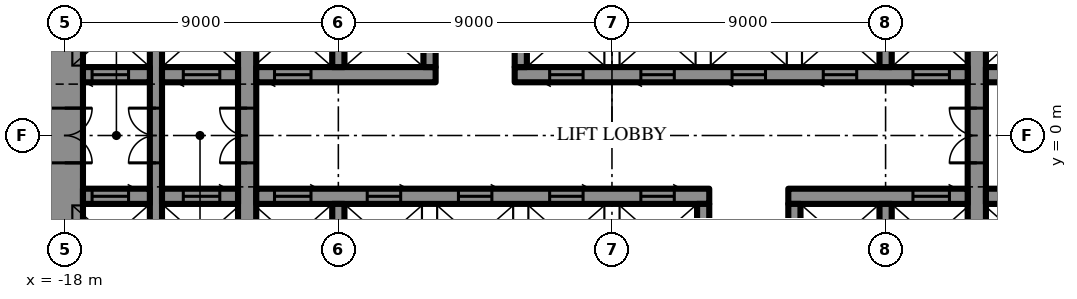
"""IFC4 building model, lengths in metres.
Left out: names, types, materials, properties, quantities, classifications, styles, units other than length and angle.
Written with IfcOpenShell. Run it as: python <this file> out.ifc"""

import sys

from ifc_helpers import new_model, si_unit, direction, frame, frame_2d, origin, place, context, subcontext, project, spatial, rectangle, extrude, element, fill, save


model = new_model("IFC4")
c1 = context("Model", 3, precision=1e-05, world=origin(), true_north=direction((0.0, 1.0)))
c2 = subcontext(c1, "Body", "Model", "MODEL_VIEW")
j1 = project(units=[si_unit("LENGTHUNIT", "METRE"), si_unit("PLANEANGLEUNIT", "RADIAN")], contexts=[c1])
p1 = place(None, origin())
s1 = spatial("IfcSite", under=j1, at=p1, CompositionType="ELEMENT")
p2 = place(p1, origin())
s2 = spatial("IfcBuilding", under=s1, at=p2, CompositionType="ELEMENT")
p3 = place(p2, origin())
s3 = spatial("IfcBuildingStorey", under=s2, at=p3, CompositionType="ELEMENT", Elevation=0.0)
p4 = place(p3, frame((-18.0, 10.7, 0.0), z_axis=(0.0, 0.0, 1.0), x_axis=(0.0, -1.0, 0.0)))
e1 = element("IfcWall", 1, at=p4, inside=s3, PredefinedType="SHEAR", context=c2, shape_type="SweptSolid", body=[
    extrude(rectangle(XDim=21.4, YDim=1.2, at=frame_2d((10.7, 0.0))), origin(), (0.0, 0.0, 1.0), 7.0),
])
p5 = place(p4, frame((9.8, 0.0, 0.0)))
e2 = element("IfcOpeningElement", 2, at=p5, cuts=e1, PredefinedType="OPENING", context=c2, shape_type="SweptSolid", body=[
    extrude(rectangle(XDim=1.8, YDim=2.4, at=frame_2d((0.9, 1.2))), frame((0.0, 0.61, 0.0), z_axis=(0.0, -1.0, 0.0), x_axis=(1.0, 0.0, 0.0)), (0.0, 0.0, 1.0), 1.22),
])
p6 = place(p3, frame((12.0, -10.7, 0.0), z_axis=(0.0, 0.0, 1.0), x_axis=(0.0, 1.0, 0.0)))
e3 = element("IfcWall", 3, at=p6, inside=s3, PredefinedType="SHEAR", context=c2, shape_type="SweptSolid", body=[
    extrude(rectangle(XDim=21.4, YDim=0.6, at=frame_2d((10.7, 0.0))), origin(), (0.0, 0.0, 1.0), 7.0),
])
p7 = place(p6, frame((9.8, 0.0, 0.0)))
e4 = element("IfcOpeningElement", 4, at=p7, cuts=e3, PredefinedType="OPENING", context=c2, shape_type="SweptSolid", body=[
    extrude(rectangle(XDim=1.8, YDim=2.4, at=frame_2d((0.9, 1.2))), frame((0.0, 0.31, 0.0), z_axis=(0.0, -1.0, 0.0), x_axis=(1.0, 0.0, 0.0)), (0.0, 0.0, 1.0), 0.62),
])
p8 = place(p3, frame((-12.0, -10.7, 0.0), z_axis=(0.0, 0.0, 1.0), x_axis=(0.0, 1.0, 0.0)))
e5 = element("IfcWall", 5, at=p8, inside=s3, PredefinedType="SHEAR", context=c2, shape_type="SweptSolid", body=[
    extrude(rectangle(XDim=21.4, YDim=0.6, at=frame_2d((10.7, 0.0))), origin(), (0.0, 0.0, 1.0), 7.0),
])
p9 = place(p8, frame((9.8, 0.0, 0.0)))
e6 = element("IfcOpeningElement", 6, at=p9, cuts=e5, PredefinedType="OPENING", context=c2, shape_type="SweptSolid", body=[
    extrude(rectangle(XDim=1.8, YDim=2.4, at=frame_2d((0.9, 1.2))), frame((0.0, 0.31, 0.0), z_axis=(0.0, -1.0, 0.0), x_axis=(1.0, 0.0, 0.0)), (0.0, 0.0, 1.0), 0.62),
])
p10 = place(p3, frame((-15.0, -10.7, 0.0), z_axis=(0.0, 0.0, 1.0), x_axis=(0.0, 1.0, 0.0)))
e7 = element("IfcWall", 7, at=p10, inside=s3, PredefinedType="SHEAR", context=c2, shape_type="SweptSolid", body=[
    extrude(rectangle(XDim=21.4, YDim=0.4, at=frame_2d((10.7, 0.0))), origin(), (0.0, 0.0, 1.0), 7.0),
])
p11 = place(p10, frame((9.8, 0.0, 0.0)))
e8 = element("IfcOpeningElement", 8, at=p11, cuts=e7, PredefinedType="OPENING", context=c2, shape_type="SweptSolid", body=[
    extrude(rectangle(XDim=1.8, YDim=2.4, at=frame_2d((0.9, 1.2))), frame((0.0, 0.21, 0.0), z_axis=(0.0, -1.0, 0.0), x_axis=(1.0, 0.0, 0.0)), (0.0, 0.0, 1.0), 0.42),
])
p12 = place(p3, frame((-17.4, 2.0, 0.0), z_axis=(0.0, 0.0, 1.0), x_axis=(1.0, 0.0, 0.0)))
e9 = element("IfcWall", 9, at=p12, inside=s3, PredefinedType="SHEAR", context=c2, shape_type="SweptSolid", body=[
    extrude(rectangle(XDim=2.2, YDim=0.5, at=frame_2d((1.1, 0.0))), origin(), (0.0, 0.0, 1.0), 7.0),
])
p13 = place(p12, frame((0.3, 0.0, 0.0)))
e10 = element("IfcOpeningElement", 10, at=p13, cuts=e9, PredefinedType="OPENING", context=c2, shape_type="SweptSolid", body=[
    extrude(rectangle(XDim=1.2, YDim=2.2, at=frame_2d((0.6, 1.1))), frame((0.0, 0.26, 0.0), z_axis=(0.0, -1.0, 0.0), x_axis=(1.0, 0.0, 0.0)), (0.0, 0.0, 1.0), 0.52),
])
p14 = place(p3, frame((-14.8, 2.0, 0.0), z_axis=(0.0, 0.0, 1.0), x_axis=(1.0, 0.0, 0.0)))
e11 = element("IfcWall", 11, at=p14, inside=s3, PredefinedType="SHEAR", context=c2, shape_type="SweptSolid", body=[
    extrude(rectangle(XDim=2.5, YDim=0.5, at=frame_2d((1.25, 0.0))), origin(), (0.0, 0.0, 1.0), 7.0),
])
p15 = place(p14, frame((0.7, 0.0, 0.0)))
e12 = element("IfcOpeningElement", 12, at=p15, cuts=e11, PredefinedType="OPENING", context=c2, shape_type="SweptSolid", body=[
    extrude(rectangle(XDim=1.2, YDim=2.2, at=frame_2d((0.6, 1.1))), frame((0.0, 0.26, 0.0), z_axis=(0.0, -1.0, 0.0), x_axis=(1.0, 0.0, 0.0)), (0.0, 0.0, 1.0), 0.52),
])
p16 = place(p3, frame((-11.7, 2.0, 0.0), z_axis=(0.0, 0.0, 1.0), x_axis=(1.0, 0.0, 0.0)))
e13 = element("IfcWall", 13, at=p16, inside=s3, PredefinedType="SHEAR", context=c2, shape_type="SweptSolid", body=[
    extrude(rectangle(XDim=5.9, YDim=0.5, at=frame_2d((2.95, 0.0))), origin(), (0.0, 0.0, 1.0), 7.0),
])
p17 = place(p16, frame((0.6, 0.0, 0.0)))
e14 = element("IfcOpeningElement", 14, at=p17, cuts=e13, PredefinedType="OPENING", context=c2, shape_type="SweptSolid", body=[
    extrude(rectangle(XDim=1.2, YDim=2.2, at=frame_2d((0.6, 1.1))), frame((0.0, 0.26, 0.0), z_axis=(0.0, -1.0, 0.0), x_axis=(1.0, 0.0, 0.0)), (0.0, 0.0, 1.0), 0.52),
])
p18 = place(p3, frame((-3.2, 2.0, 0.0), z_axis=(0.0, 0.0, 1.0), x_axis=(1.0, 0.0, 0.0)))
e15 = element("IfcWall", 15, at=p18, inside=s3, PredefinedType="SHEAR", context=c2, shape_type="SweptSolid", body=[
    extrude(rectangle(XDim=14.9, YDim=0.5, at=frame_2d((7.45, 0.0))), origin(), (0.0, 0.0, 1.0), 7.0),
])
p19 = place(p18, frame((1.15, 0.0, 0.0)))
e16 = element("IfcOpeningElement", 16, at=p19, cuts=e15, PredefinedType="OPENING", context=c2, shape_type="SweptSolid", body=[
    extrude(rectangle(XDim=1.1, YDim=2.2, at=frame_2d((0.55, 1.1))), frame((0.0, 0.26, 0.0), z_axis=(0.0, -1.0, 0.0), x_axis=(1.0, 0.0, 0.0)), (0.0, 0.0, 1.0), 0.52),
])
p20 = place(p18, frame((4.15, 0.0, 0.0)))
e17 = element("IfcOpeningElement", 17, at=p20, cuts=e15, PredefinedType="OPENING", context=c2, shape_type="SweptSolid", body=[
    extrude(rectangle(XDim=1.1, YDim=2.2, at=frame_2d((0.55, 1.1))), frame((0.0, 0.26, 0.0), z_axis=(0.0, -1.0, 0.0), x_axis=(1.0, 0.0, 0.0)), (0.0, 0.0, 1.0), 0.52),
])
p21 = place(p18, frame((7.15, 0.0, 0.0)))
e18 = element("IfcOpeningElement", 18, at=p21, cuts=e15, PredefinedType="OPENING", context=c2, shape_type="SweptSolid", body=[
    extrude(rectangle(XDim=1.1, YDim=2.2, at=frame_2d((0.55, 1.1))), frame((0.0, 0.26, 0.0), z_axis=(0.0, -1.0, 0.0), x_axis=(1.0, 0.0, 0.0)), (0.0, 0.0, 1.0), 0.52),
])
p22 = place(p18, frame((10.15, 0.0, 0.0)))
e19 = element("IfcOpeningElement", 19, at=p22, cuts=e15, PredefinedType="OPENING", context=c2, shape_type="SweptSolid", body=[
    extrude(rectangle(XDim=1.1, YDim=2.2, at=frame_2d((0.55, 1.1))), frame((0.0, 0.26, 0.0), z_axis=(0.0, -1.0, 0.0), x_axis=(1.0, 0.0, 0.0)), (0.0, 0.0, 1.0), 0.52),
])
p23 = place(p18, frame((13.1, 0.0, 0.0)))
e20 = element("IfcOpeningElement", 20, at=p23, cuts=e15, PredefinedType="OPENING", context=c2, shape_type="SweptSolid", body=[
    extrude(rectangle(XDim=1.2, YDim=2.2, at=frame_2d((0.6, 1.1))), frame((0.0, 0.26, 0.0), z_axis=(0.0, -1.0, 0.0), x_axis=(1.0, 0.0, 0.0)), (0.0, 0.0, 1.0), 0.52),
])
p24 = place(p3, frame((12.3, 2.0, 0.0), z_axis=(0.0, 0.0, 1.0), x_axis=(1.0, 0.0, 0.0)))
e21 = element("IfcWall", 21, at=p24, inside=s3, PredefinedType="SHEAR", context=c2, shape_type="SweptSolid", body=[
    extrude(rectangle(XDim=2.5, YDim=0.5, at=frame_2d((1.25, 0.0))), origin(), (0.0, 0.0, 1.0), 7.0),
])
p25 = place(p24, frame((0.6, 0.0, 0.0)))
e22 = element("IfcOpeningElement", 22, at=p25, cuts=e21, PredefinedType="OPENING", context=c2, shape_type="SweptSolid", body=[
    extrude(rectangle(XDim=1.2, YDim=2.2, at=frame_2d((0.6, 1.1))), frame((0.0, 0.26, 0.0), z_axis=(0.0, -1.0, 0.0), x_axis=(1.0, 0.0, 0.0)), (0.0, 0.0, 1.0), 0.52),
])
for number, where, z_axis, x_axis in (
    (23, (-9.0, 2.25, 0.0), (0.0, 0.0, 1.0), (0.0, 1.0, 0.0)),
    (24, (-6.0, 2.25, 0.0), (0.0, 0.0, 1.0), (0.0, 1.0, 0.0)),
    (25, (-3.0, 2.25, 0.0), (0.0, 0.0, 1.0), (0.0, 1.0, 0.0)),
    (26, (9.0, 2.25, 0.0), (0.0, 0.0, 1.0), (0.0, 1.0, 0.0)),
):
    element("IfcWall", number, at=place(p3, frame(where, z_axis=z_axis, x_axis=x_axis)), inside=s3, PredefinedType="SHEAR", context=c2, shape_type="SweptSolid", body=[
        extrude(rectangle(XDim=2.3, YDim=0.4, at=frame_2d((1.15, 0.0))), origin(), (0.0, 0.0, 1.0), 7.0),
    ])
p26 = place(p3, frame((14.8, -2.0, 0.0), z_axis=(0.0, 0.0, 1.0), x_axis=(-1.0, 0.0, 0.0)))
e27 = element("IfcWall", 27, at=p26, inside=s3, PredefinedType="SHEAR", context=c2, shape_type="SweptSolid", body=[
    extrude(rectangle(XDim=2.5, YDim=0.5, at=frame_2d((1.25, 0.0))), origin(), (0.0, 0.0, 1.0), 7.0),
])
p27 = place(p26, frame((0.7, 0.0, 0.0)))
e28 = element("IfcOpeningElement", 28, at=p27, cuts=e27, PredefinedType="OPENING", context=c2, shape_type="SweptSolid", body=[
    extrude(rectangle(XDim=1.2, YDim=2.2, at=frame_2d((0.6, 1.1))), frame((0.0, 0.26, 0.0), z_axis=(0.0, -1.0, 0.0), x_axis=(1.0, 0.0, 0.0)), (0.0, 0.0, 1.0), 0.52),
])
p28 = place(p3, frame((11.7, -2.0, 0.0), z_axis=(0.0, 0.0, 1.0), x_axis=(-1.0, 0.0, 0.0)))
e29 = element("IfcWall", 29, at=p28, inside=s3, PredefinedType="SHEAR", context=c2, shape_type="SweptSolid", body=[
    extrude(rectangle(XDim=5.9, YDim=0.5, at=frame_2d((2.95, 0.0))), origin(), (0.0, 0.0, 1.0), 7.0),
])
p29 = place(p28, frame((0.6, 0.0, 0.0)))
e30 = element("IfcOpeningElement", 30, at=p29, cuts=e29, PredefinedType="OPENING", context=c2, shape_type="SweptSolid", body=[
    extrude(rectangle(XDim=1.2, YDim=2.2, at=frame_2d((0.6, 1.1))), frame((0.0, 0.26, 0.0), z_axis=(0.0, -1.0, 0.0), x_axis=(1.0, 0.0, 0.0)), (0.0, 0.0, 1.0), 0.52),
])
p30 = place(p3, frame((3.2, -2.0, 0.0), z_axis=(0.0, 0.0, 1.0), x_axis=(-1.0, 0.0, 0.0)))
e31 = element("IfcWall", 31, at=p30, inside=s3, PredefinedType="SHEAR", context=c2, shape_type="SweptSolid", body=[
    extrude(rectangle(XDim=14.9, YDim=0.5, at=frame_2d((7.45, 0.0))), origin(), (0.0, 0.0, 1.0), 7.0),
])
p31 = place(p30, frame((1.15, 0.0, 0.0)))
e32 = element("IfcOpeningElement", 32, at=p31, cuts=e31, PredefinedType="OPENING", context=c2, shape_type="SweptSolid", body=[
    extrude(rectangle(XDim=1.1, YDim=2.2, at=frame_2d((0.55, 1.1))), frame((0.0, 0.26, 0.0), z_axis=(0.0, -1.0, 0.0), x_axis=(1.0, 0.0, 0.0)), (0.0, 0.0, 1.0), 0.52),
])
p32 = place(p30, frame((4.15, 0.0, 0.0)))
e33 = element("IfcOpeningElement", 33, at=p32, cuts=e31, PredefinedType="OPENING", context=c2, shape_type="SweptSolid", body=[
    extrude(rectangle(XDim=1.1, YDim=2.2, at=frame_2d((0.55, 1.1))), frame((0.0, 0.26, 0.0), z_axis=(0.0, -1.0, 0.0), x_axis=(1.0, 0.0, 0.0)), (0.0, 0.0, 1.0), 0.52),
])
p33 = place(p30, frame((7.15, 0.0, 0.0)))
e34 = element("IfcOpeningElement", 34, at=p33, cuts=e31, PredefinedType="OPENING", context=c2, shape_type="SweptSolid", body=[
    extrude(rectangle(XDim=1.1, YDim=2.2, at=frame_2d((0.55, 1.1))), frame((0.0, 0.26, 0.0), z_axis=(0.0, -1.0, 0.0), x_axis=(1.0, 0.0, 0.0)), (0.0, 0.0, 1.0), 0.52),
])
p34 = place(p30, frame((10.15, 0.0, 0.0)))
e35 = element("IfcOpeningElement", 35, at=p34, cuts=e31, PredefinedType="OPENING", context=c2, shape_type="SweptSolid", body=[
    extrude(rectangle(XDim=1.1, YDim=2.2, at=frame_2d((0.55, 1.1))), frame((0.0, 0.26, 0.0), z_axis=(0.0, -1.0, 0.0), x_axis=(1.0, 0.0, 0.0)), (0.0, 0.0, 1.0), 0.52),
])
p35 = place(p30, frame((13.1, 0.0, 0.0)))
e36 = element("IfcOpeningElement", 36, at=p35, cuts=e31, PredefinedType="OPENING", context=c2, shape_type="SweptSolid", body=[
    extrude(rectangle(XDim=1.2, YDim=2.2, at=frame_2d((0.6, 1.1))), frame((0.0, 0.26, 0.0), z_axis=(0.0, -1.0, 0.0), x_axis=(1.0, 0.0, 0.0)), (0.0, 0.0, 1.0), 0.52),
])
p36 = place(p3, frame((-12.3, -2.0, 0.0), z_axis=(0.0, 0.0, 1.0), x_axis=(-1.0, 0.0, 0.0)))
e37 = element("IfcWall", 37, at=p36, inside=s3, PredefinedType="SHEAR", context=c2, shape_type="SweptSolid", body=[
    extrude(rectangle(XDim=2.5, YDim=0.5, at=frame_2d((1.25, 0.0))), origin(), (0.0, 0.0, 1.0), 7.0),
])
p37 = place(p36, frame((0.6, 0.0, 0.0)))
e38 = element("IfcOpeningElement", 38, at=p37, cuts=e37, PredefinedType="OPENING", context=c2, shape_type="SweptSolid", body=[
    extrude(rectangle(XDim=1.2, YDim=2.2, at=frame_2d((0.6, 1.1))), frame((0.0, 0.26, 0.0), z_axis=(0.0, -1.0, 0.0), x_axis=(1.0, 0.0, 0.0)), (0.0, 0.0, 1.0), 0.52),
])
p38 = place(p3, frame((-15.2, -2.0, 0.0), z_axis=(0.0, 0.0, 1.0), x_axis=(-1.0, 0.0, 0.0)))
e39 = element("IfcWall", 39, at=p38, inside=s3, PredefinedType="SHEAR", context=c2, shape_type="SweptSolid", body=[
    extrude(rectangle(XDim=2.2, YDim=0.5, at=frame_2d((1.1, 0.0))), origin(), (0.0, 0.0, 1.0), 7.0),
])
p39 = place(p38, frame((0.7, 0.0, 0.0)))
e40 = element("IfcOpeningElement", 40, at=p39, cuts=e39, PredefinedType="OPENING", context=c2, shape_type="SweptSolid", body=[
    extrude(rectangle(XDim=1.2, YDim=2.2, at=frame_2d((0.6, 1.1))), frame((0.0, 0.26, 0.0), z_axis=(0.0, -1.0, 0.0), x_axis=(1.0, 0.0, 0.0)), (0.0, 0.0, 1.0), 0.52),
])
for number, where, z_axis, x_axis in (
    (41, (9.0, -2.25, 0.0), (0.0, 0.0, 1.0), (0.0, -1.0, 0.0)),
    (42, (6.0, -2.25, 0.0), (0.0, 0.0, 1.0), (0.0, -1.0, 0.0)),
    (43, (3.0, -2.25, 0.0), (0.0, 0.0, 1.0), (0.0, -1.0, 0.0)),
    (44, (-9.0, -2.25, 0.0), (0.0, 0.0, 1.0), (0.0, -1.0, 0.0)),
):
    element("IfcWall", number, at=place(p3, frame(where, z_axis=z_axis, x_axis=x_axis)), inside=s3, PredefinedType="SHEAR", context=c2, shape_type="SweptSolid", body=[
        extrude(rectangle(XDim=2.3, YDim=0.4, at=frame_2d((1.15, 0.0))), origin(), (0.0, 0.0, 1.0), 7.0),
    ])
p40 = place(p5, origin())
e45 = element("IfcDoor", 45, at=p40, inside=s3, OperationType="DOUBLE_DOOR_SINGLE_SWING", PredefinedType="DOOR", context=c2, shape_type="SweptSolid", body=[
    extrude(rectangle(XDim=1.8, YDim=2.4, at=frame_2d((0.9, 1.2))), frame((0.0, 0.025, 0.0), z_axis=(0.0, -1.0, 0.0), x_axis=(1.0, 0.0, 0.0)), (0.0, 0.0, 1.0), 0.05),
])
fill(e2, e45)
p41 = place(p7, origin())
e46 = element("IfcDoor", 46, at=p41, inside=s3, OperationType="DOUBLE_DOOR_SINGLE_SWING", PredefinedType="DOOR", context=c2, shape_type="SweptSolid", body=[
    extrude(rectangle(XDim=1.8, YDim=2.4, at=frame_2d((0.9, 1.2))), frame((0.0, 0.025, 0.0), z_axis=(0.0, -1.0, 0.0), x_axis=(1.0, 0.0, 0.0)), (0.0, 0.0, 1.0), 0.05),
])
fill(e4, e46)
p42 = place(p9, origin())
e47 = element("IfcDoor", 47, at=p42, inside=s3, OperationType="DOUBLE_DOOR_SINGLE_SWING", PredefinedType="DOOR", context=c2, shape_type="SweptSolid", body=[
    extrude(rectangle(XDim=1.8, YDim=2.4, at=frame_2d((0.9, 1.2))), frame((0.0, 0.025, 0.0), z_axis=(0.0, -1.0, 0.0), x_axis=(1.0, 0.0, 0.0)), (0.0, 0.0, 1.0), 0.05),
])
fill(e6, e47)
p43 = place(p11, origin())
e48 = element("IfcDoor", 48, at=p43, inside=s3, OperationType="DOUBLE_DOOR_SINGLE_SWING", PredefinedType="DOOR", context=c2, shape_type="SweptSolid", body=[
    extrude(rectangle(XDim=1.8, YDim=2.4, at=frame_2d((0.9, 1.2))), frame((0.0, 0.025, 0.0), z_axis=(0.0, -1.0, 0.0), x_axis=(1.0, 0.0, 0.0)), (0.0, 0.0, 1.0), 0.05),
])
fill(e8, e48)
p44 = place(p13, frame((1.2, 0.0, 0.0), z_axis=(0.0, 0.0, 1.0), x_axis=(-1.0, 0.0, 0.0)))
e49 = element("IfcDoor", 49, at=p44, inside=s3, OperationType="SLIDING_TO_LEFT", PredefinedType="DOOR", context=c2, shape_type="SweptSolid", body=[
    extrude(rectangle(XDim=1.2, YDim=2.2, at=frame_2d((0.6, 1.1))), frame((0.0, 0.025, 0.0), z_axis=(0.0, -1.0, 0.0), x_axis=(1.0, 0.0, 0.0)), (0.0, 0.0, 1.0), 0.05),
])
fill(e10, e49)
p45 = place(p15, frame((1.2, 0.0, 0.0), z_axis=(0.0, 0.0, 1.0), x_axis=(-1.0, 0.0, 0.0)))
e50 = element("IfcDoor", 50, at=p45, inside=s3, OperationType="SLIDING_TO_LEFT", PredefinedType="DOOR", context=c2, shape_type="SweptSolid", body=[
    extrude(rectangle(XDim=1.2, YDim=2.2, at=frame_2d((0.6, 1.1))), frame((0.0, 0.025, 0.0), z_axis=(0.0, -1.0, 0.0), x_axis=(1.0, 0.0, 0.0)), (0.0, 0.0, 1.0), 0.05),
])
fill(e12, e50)
p46 = place(p17, frame((1.2, 0.0, 0.0), z_axis=(0.0, 0.0, 1.0), x_axis=(-1.0, 0.0, 0.0)))
e51 = element("IfcDoor", 51, at=p46, inside=s3, OperationType="SLIDING_TO_LEFT", PredefinedType="DOOR", context=c2, shape_type="SweptSolid", body=[
    extrude(rectangle(XDim=1.2, YDim=2.2, at=frame_2d((0.6, 1.1))), frame((0.0, 0.025, 0.0), z_axis=(0.0, -1.0, 0.0), x_axis=(1.0, 0.0, 0.0)), (0.0, 0.0, 1.0), 0.05),
])
fill(e14, e51)
p47 = place(p19, frame((1.1, 0.0, 0.0), z_axis=(0.0, 0.0, 1.0), x_axis=(-1.0, 0.0, 0.0)))
e52 = element("IfcDoor", 52, at=p47, inside=s3, OperationType="SLIDING_TO_LEFT", PredefinedType="DOOR", context=c2, shape_type="SweptSolid", body=[
    extrude(rectangle(XDim=1.1, YDim=2.2, at=frame_2d((0.55, 1.1))), frame((0.0, 0.025, 0.0), z_axis=(0.0, -1.0, 0.0), x_axis=(1.0, 0.0, 0.0)), (0.0, 0.0, 1.0), 0.05),
])
fill(e16, e52)
p48 = place(p20, frame((1.1, 0.0, 0.0), z_axis=(0.0, 0.0, 1.0), x_axis=(-1.0, 0.0, 0.0)))
e53 = element("IfcDoor", 53, at=p48, inside=s3, OperationType="SLIDING_TO_LEFT", PredefinedType="DOOR", context=c2, shape_type="SweptSolid", body=[
    extrude(rectangle(XDim=1.1, YDim=2.2, at=frame_2d((0.55, 1.1))), frame((0.0, 0.025, 0.0), z_axis=(0.0, -1.0, 0.0), x_axis=(1.0, 0.0, 0.0)), (0.0, 0.0, 1.0), 0.05),
])
fill(e17, e53)
p49 = place(p21, frame((1.1, 0.0, 0.0), z_axis=(0.0, 0.0, 1.0), x_axis=(-1.0, 0.0, 0.0)))
e54 = element("IfcDoor", 54, at=p49, inside=s3, OperationType="SLIDING_TO_LEFT", PredefinedType="DOOR", context=c2, shape_type="SweptSolid", body=[
    extrude(rectangle(XDim=1.1, YDim=2.2, at=frame_2d((0.55, 1.1))), frame((0.0, 0.025, 0.0), z_axis=(0.0, -1.0, 0.0), x_axis=(1.0, 0.0, 0.0)), (0.0, 0.0, 1.0), 0.05),
])
fill(e18, e54)
p50 = place(p22, frame((1.1, 0.0, 0.0), z_axis=(0.0, 0.0, 1.0), x_axis=(-1.0, 0.0, 0.0)))
e55 = element("IfcDoor", 55, at=p50, inside=s3, OperationType="SLIDING_TO_LEFT", PredefinedType="DOOR", context=c2, shape_type="SweptSolid", body=[
    extrude(rectangle(XDim=1.1, YDim=2.2, at=frame_2d((0.55, 1.1))), frame((0.0, 0.025, 0.0), z_axis=(0.0, -1.0, 0.0), x_axis=(1.0, 0.0, 0.0)), (0.0, 0.0, 1.0), 0.05),
])
fill(e19, e55)
p51 = place(p23, frame((1.2, 0.0, 0.0), z_axis=(0.0, 0.0, 1.0), x_axis=(-1.0, 0.0, 0.0)))
e56 = element("IfcDoor", 56, at=p51, inside=s3, OperationType="SLIDING_TO_LEFT", PredefinedType="DOOR", context=c2, shape_type="SweptSolid", body=[
    extrude(rectangle(XDim=1.2, YDim=2.2, at=frame_2d((0.6, 1.1))), frame((0.0, 0.025, 0.0), z_axis=(0.0, -1.0, 0.0), x_axis=(1.0, 0.0, 0.0)), (0.0, 0.0, 1.0), 0.05),
])
fill(e20, e56)
p52 = place(p29, frame((1.2, 0.0, 0.0), z_axis=(0.0, 0.0, 1.0), x_axis=(-1.0, 0.0, 0.0)))
e57 = element("IfcDoor", 57, at=p52, inside=s3, OperationType="SLIDING_TO_LEFT", PredefinedType="DOOR", context=c2, shape_type="SweptSolid", body=[
    extrude(rectangle(XDim=1.2, YDim=2.2, at=frame_2d((0.6, 1.1))), frame((0.0, 0.025, 0.0), z_axis=(0.0, -1.0, 0.0), x_axis=(1.0, 0.0, 0.0)), (0.0, 0.0, 1.0), 0.05),
])
fill(e30, e57)
p53 = place(p31, frame((1.1, 0.0, 0.0), z_axis=(0.0, 0.0, 1.0), x_axis=(-1.0, 0.0, 0.0)))
e58 = element("IfcDoor", 58, at=p53, inside=s3, OperationType="SLIDING_TO_LEFT", PredefinedType="DOOR", context=c2, shape_type="SweptSolid", body=[
    extrude(rectangle(XDim=1.1, YDim=2.2, at=frame_2d((0.55, 1.1))), frame((0.0, 0.025, 0.0), z_axis=(0.0, -1.0, 0.0), x_axis=(1.0, 0.0, 0.0)), (0.0, 0.0, 1.0), 0.05),
])
fill(e32, e58)
p54 = place(p32, frame((1.1, 0.0, 0.0), z_axis=(0.0, 0.0, 1.0), x_axis=(-1.0, 0.0, 0.0)))
e59 = element("IfcDoor", 59, at=p54, inside=s3, OperationType="SLIDING_TO_LEFT", PredefinedType="DOOR", context=c2, shape_type="SweptSolid", body=[
    extrude(rectangle(XDim=1.1, YDim=2.2, at=frame_2d((0.55, 1.1))), frame((0.0, 0.025, 0.0), z_axis=(0.0, -1.0, 0.0), x_axis=(1.0, 0.0, 0.0)), (0.0, 0.0, 1.0), 0.05),
])
fill(e33, e59)
p55 = place(p33, frame((1.1, 0.0, 0.0), z_axis=(0.0, 0.0, 1.0), x_axis=(-1.0, 0.0, 0.0)))
e60 = element("IfcDoor", 60, at=p55, inside=s3, OperationType="SLIDING_TO_LEFT", PredefinedType="DOOR", context=c2, shape_type="SweptSolid", body=[
    extrude(rectangle(XDim=1.1, YDim=2.2, at=frame_2d((0.55, 1.1))), frame((0.0, 0.025, 0.0), z_axis=(0.0, -1.0, 0.0), x_axis=(1.0, 0.0, 0.0)), (0.0, 0.0, 1.0), 0.05),
])
fill(e34, e60)
p56 = place(p34, frame((1.1, 0.0, 0.0), z_axis=(0.0, 0.0, 1.0), x_axis=(-1.0, 0.0, 0.0)))
e61 = element("IfcDoor", 61, at=p56, inside=s3, OperationType="SLIDING_TO_LEFT", PredefinedType="DOOR", context=c2, shape_type="SweptSolid", body=[
    extrude(rectangle(XDim=1.1, YDim=2.2, at=frame_2d((0.55, 1.1))), frame((0.0, 0.025, 0.0), z_axis=(0.0, -1.0, 0.0), x_axis=(1.0, 0.0, 0.0)), (0.0, 0.0, 1.0), 0.05),
])
fill(e35, e61)
p57 = place(p35, frame((1.2, 0.0, 0.0), z_axis=(0.0, 0.0, 1.0), x_axis=(-1.0, 0.0, 0.0)))
e62 = element("IfcDoor", 62, at=p57, inside=s3, OperationType="SLIDING_TO_LEFT", PredefinedType="DOOR", context=c2, shape_type="SweptSolid", body=[
    extrude(rectangle(XDim=1.2, YDim=2.2, at=frame_2d((0.6, 1.1))), frame((0.0, 0.025, 0.0), z_axis=(0.0, -1.0, 0.0), x_axis=(1.0, 0.0, 0.0)), (0.0, 0.0, 1.0), 0.05),
])
fill(e36, e62)
p58 = place(p37, frame((1.2, 0.0, 0.0), z_axis=(0.0, 0.0, 1.0), x_axis=(-1.0, 0.0, 0.0)))
e63 = element("IfcDoor", 63, at=p58, inside=s3, OperationType="SLIDING_TO_LEFT", PredefinedType="DOOR", context=c2, shape_type="SweptSolid", body=[
    extrude(rectangle(XDim=1.2, YDim=2.2, at=frame_2d((0.6, 1.1))), frame((0.0, 0.025, 0.0), z_axis=(0.0, -1.0, 0.0), x_axis=(1.0, 0.0, 0.0)), (0.0, 0.0, 1.0), 0.05),
])
fill(e38, e63)
p59 = place(p39, frame((1.2, 0.0, 0.0), z_axis=(0.0, 0.0, 1.0), x_axis=(-1.0, 0.0, 0.0)))
e64 = element("IfcDoor", 64, at=p59, inside=s3, OperationType="SLIDING_TO_LEFT", PredefinedType="DOOR", context=c2, shape_type="SweptSolid", body=[
    extrude(rectangle(XDim=1.2, YDim=2.2, at=frame_2d((0.6, 1.1))), frame((0.0, 0.025, 0.0), z_axis=(0.0, -1.0, 0.0), x_axis=(1.0, 0.0, 0.0)), (0.0, 0.0, 1.0), 0.05),
])
fill(e40, e64)
save(model, sys.argv[1])
